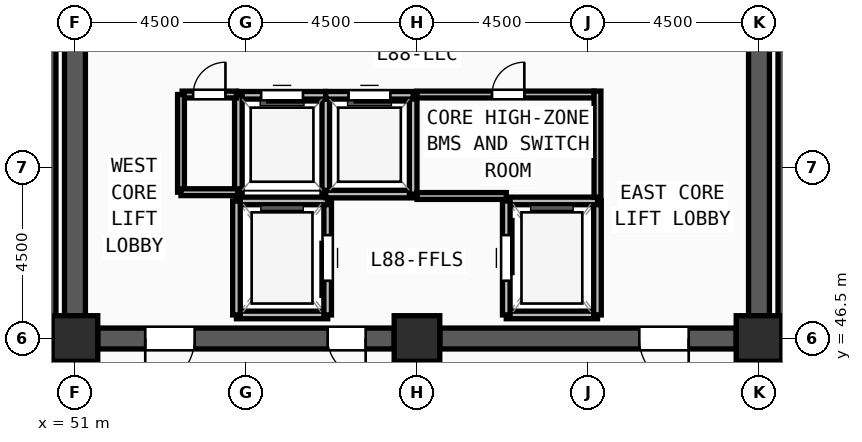
"""IFC4 building model, lengths in metres.
Left out: names, types, materials, properties, quantities, classifications, styles, units other than length and angle.
Written with IfcOpenShell. Run it as: python <this file> out.ifc"""

import sys

from ifc_helpers import new_model, si_unit, direction, frame, frame_2d, origin, origin_2d, place, context, subcontext, project, spatial, rectangle, extrude, source, transform, mapped, element, fill, save


model = new_model("IFC4")
c1 = context("Model", 3, precision=1e-05, world=origin(), true_north=direction((0.0, 1.0)))
c2 = subcontext(c1, "Body", "Model", "MODEL_VIEW")
j1 = project(units=[si_unit("LENGTHUNIT", "METRE"), si_unit("PLANEANGLEUNIT", "RADIAN")], contexts=[c1])
p1 = place(None, origin())
s1 = spatial("IfcSite", under=j1, at=p1, CompositionType="ELEMENT")
p2 = place(p1, origin())
s2 = spatial("IfcBuilding", under=s1, at=p2, CompositionType="ELEMENT")
p3 = place(p2, frame((0.0, 0.0, 339.75)))
s3 = spatial("IfcBuildingStorey", under=s2, at=p3, CompositionType="ELEMENT", Elevation=339.75)
m1 = source(origin(), c2, "Body", "SweptSolid", [
    extrude(rectangle(XDim=1.2, YDim=1.2, at=origin_2d()), origin(), (0.0, 0.0, 1.0), 3.75),
])
for number, where, z_axis, x_axis in (
    (1, (51.0, 46.5, 0.0), (0.0, 0.0, 1.0), (1.0, 0.0, 0.0)),
    (2, (60.0, 46.5, 0.0), (0.0, 0.0, 1.0), (1.0, 0.0, 0.0)),
    (3, (69.0, 46.5, 0.0), (0.0, 0.0, 1.0), (1.0, 0.0, 0.0)),
):
    element("IfcColumn", number, at=place(p3, frame(where, z_axis=z_axis, x_axis=x_axis)), inside=s3, PredefinedType="COLUMN", context=c2, shape_type="MappedRepresentation", body=[
        mapped(m1, transform((0.0, 0.0, 0.0), x_axis=(1.0, 0.0, 0.0), y_axis=(0.0, 1.0, 0.0), z_axis=(0.0, 0.0, 1.0), scale=1.0)),
    ])
p4 = place(p3, frame((69.0, 60.9, 0.0), z_axis=(0.0, 0.0, 1.0), x_axis=(0.0, -1.0, 0.0)))
e4 = element("IfcWall", 4, at=p4, inside=s3, PredefinedType="SHEAR", context=c2, shape_type="SweptSolid", body=[
    extrude(rectangle(XDim=13.8, YDim=0.55, at=frame_2d((6.9, 0.0))), origin(), (0.0, 0.0, 1.0), 3.57),
])
m2 = source(origin(), c2, "Body", "SweptSolid", [
    extrude(rectangle(XDim=1.2, YDim=2.2, at=frame_2d((0.6, 1.1))), frame((0.0, 0.285, 0.0), z_axis=(0.0, -1.0, 0.0), x_axis=(1.0, 0.0, 0.0)), (0.0, 0.0, 1.0), 0.57),
])
p5 = place(p4, frame((1.35, 0.0, 0.0)))
e5 = element("IfcOpeningElement", 5, at=p5, cuts=e4, PredefinedType="OPENING", context=c2, shape_type="MappedRepresentation", body=[
    mapped(m2, transform((0.0, 0.0, 0.0), x_axis=(1.0, 0.0, 0.0), y_axis=(0.0, 1.0, 0.0), z_axis=(0.0, 0.0, 1.0), scale=1.0)),
])
p6 = place(p3, frame((68.4, 46.5, 0.0), z_axis=(0.0, 0.0, 1.0), x_axis=(-1.0, 0.0, 0.0)))
e6 = element("IfcWall", 6, at=p6, inside=s3, PredefinedType="SHEAR", context=c2, shape_type="SweptSolid", body=[
    extrude(rectangle(XDim=7.8, YDim=0.55, at=frame_2d((3.9, 0.0))), origin(), (0.0, 0.0, 1.0), 3.57),
])
m3 = source(origin(), c2, "Body", "SweptSolid", [
    extrude(rectangle(XDim=1.3, YDim=2.2, at=frame_2d((0.65, 1.1))), frame((0.0, 0.285, 0.0), z_axis=(0.0, -1.0, 0.0), x_axis=(1.0, 0.0, 0.0)), (0.0, 0.0, 1.0), 0.57),
])
p7 = place(p6, frame((1.25, 0.0, 0.0)))
e7 = element("IfcOpeningElement", 7, at=p7, cuts=e6, PredefinedType="OPENING", context=c2, shape_type="MappedRepresentation", body=[
    mapped(m3, transform((0.0, 0.0, 0.0), x_axis=(1.0, 0.0, 0.0), y_axis=(0.0, 1.0, 0.0), z_axis=(0.0, 0.0, 1.0), scale=1.0)),
])
p8 = place(p3, frame((59.4, 46.5, 0.0), z_axis=(0.0, 0.0, 1.0), x_axis=(-1.0, 0.0, 0.0)))
e8 = element("IfcWall", 8, at=p8, inside=s3, PredefinedType="SHEAR", context=c2, shape_type="SweptSolid", body=[
    extrude(rectangle(XDim=7.8, YDim=0.55, at=frame_2d((3.9, 0.0))), origin(), (0.0, 0.0, 1.0), 3.57),
])
p9 = place(p8, frame((5.25, 0.0, 0.0)))
e9 = element("IfcOpeningElement", 9, at=p9, cuts=e8, PredefinedType="OPENING", context=c2, shape_type="MappedRepresentation", body=[
    mapped(m3, transform((0.0, 0.0, 0.0), x_axis=(1.0, 0.0, 0.0), y_axis=(0.0, 1.0, 0.0), z_axis=(0.0, 0.0, 1.0), scale=1.0)),
])
m4 = source(origin(), c2, "Body", "SweptSolid", [
    extrude(rectangle(XDim=1.0, YDim=2.2, at=frame_2d((0.5, 1.1))), frame((0.0, 0.285, 0.0), z_axis=(0.0, -1.0, 0.0), x_axis=(1.0, 0.0, 0.0)), (0.0, 0.0, 1.0), 0.57),
])
p10 = place(p8, frame((0.75, 0.0, 0.0)))
e10 = element("IfcOpeningElement", 10, at=p10, cuts=e8, PredefinedType="OPENING", context=c2, shape_type="MappedRepresentation", body=[
    mapped(m4, transform((0.0, 0.0, 0.0), x_axis=(1.0, 0.0, 0.0), y_axis=(0.0, 1.0, 0.0), z_axis=(0.0, 0.0, 1.0), scale=1.0)),
])
p11 = place(p3, frame((51.0, 47.1, 0.0), z_axis=(0.0, 0.0, 1.0), x_axis=(0.0, 1.0, 0.0)))
e11 = element("IfcWall", 11, at=p11, inside=s3, PredefinedType="SHEAR", context=c2, shape_type="SweptSolid", body=[
    extrude(rectangle(XDim=13.8, YDim=0.55, at=frame_2d((6.9, 0.0))), origin(), (0.0, 0.0, 1.0), 3.57),
])
for number, where, z_axis, x_axis in (
    (12, (50.38, 46.7, 0.0), (0.0, 0.0, 1.0), (0.0, 1.0, 0.0)),
    (13, (69.62, 54.52, 0.0), (0.0, 0.0, 1.0), (0.0, -1.0, 0.0)),
):
    element("IfcWall", number, at=place(p3, frame(where, z_axis=z_axis, x_axis=x_axis)), inside=s3, PredefinedType="SOLIDWALL", context=c2, shape_type="SweptSolid", body=[
        extrude(rectangle(XDim=7.82, YDim=0.24, at=frame_2d((3.91, 0.0))), origin(), (0.0, 0.0, 1.0), 3.57),
    ])
p12 = place(p3, frame((55.25, 47.12, 0.0), z_axis=(0.0, 0.0, 1.0), x_axis=(1.0, 0.0, 0.0)))
e14 = element("IfcWall", 14, at=p12, inside=s3, PredefinedType="SOLIDWALL", context=c2, shape_type="SweptSolid", body=[
    extrude(rectangle(XDim=2.4, YDim=0.2, at=frame_2d((1.2, 0.0))), origin(), (0.0, 0.0, 1.0), 3.57),
])
p13 = place(p3, frame((57.65, 47.12, 0.0), z_axis=(0.0, 0.0, 1.0), x_axis=(0.0, 1.0, 0.0)))
e15 = element("IfcWall", 15, at=p13, inside=s3, PredefinedType="SOLIDWALL", context=c2, shape_type="SweptSolid", body=[
    extrude(rectangle(XDim=3.0, YDim=0.2, at=frame_2d((1.5, 0.0))), origin(), (0.0, 0.0, 1.0), 3.57),
])
m5 = source(origin(), c2, "Body", "SweptSolid", [
    extrude(rectangle(XDim=1.2, YDim=2.3, at=frame_2d((0.6, 1.15))), frame((0.0, 0.11, 0.0), z_axis=(0.0, -1.0, 0.0), x_axis=(1.0, 0.0, 0.0)), (0.0, 0.0, 1.0), 0.22),
])
p14 = place(p13, frame((0.9, 0.0, 0.0)))
e16 = element("IfcOpeningElement", 16, at=p14, cuts=e15, PredefinedType="OPENING", context=c2, shape_type="MappedRepresentation", body=[
    mapped(m5, transform((0.0, 0.0, 0.0), x_axis=(1.0, 0.0, 0.0), y_axis=(0.0, 1.0, 0.0), z_axis=(0.0, 0.0, 1.0), scale=1.0)),
])
p15 = place(p3, frame((57.65, 50.12, 0.0), z_axis=(0.0, 0.0, 1.0), x_axis=(-1.0, 0.0, 0.0)))
e17 = element("IfcWall", 17, at=p15, inside=s3, PredefinedType="SOLIDWALL", context=c2, shape_type="SweptSolid", body=[
    extrude(rectangle(XDim=2.4, YDim=0.2, at=frame_2d((1.2, 0.0))), origin(), (0.0, 0.0, 1.0), 3.57),
])
p16 = place(p3, frame((55.25, 50.12, 0.0), z_axis=(0.0, 0.0, 1.0), x_axis=(0.0, -1.0, 0.0)))
e18 = element("IfcWall", 18, at=p16, inside=s3, PredefinedType="SOLIDWALL", context=c2, shape_type="SweptSolid", body=[
    extrude(rectangle(XDim=3.0, YDim=0.2, at=frame_2d((1.5, 0.0))), origin(), (0.0, 0.0, 1.0), 3.57),
])
p17 = place(p3, frame((62.35, 47.12, 0.0), z_axis=(0.0, 0.0, 1.0), x_axis=(1.0, 0.0, 0.0)))
e19 = element("IfcWall", 19, at=p17, inside=s3, PredefinedType="SOLIDWALL", context=c2, shape_type="SweptSolid", body=[
    extrude(rectangle(XDim=2.4, YDim=0.2, at=frame_2d((1.2, 0.0))), origin(), (0.0, 0.0, 1.0), 3.57),
])
p18 = place(p3, frame((64.75, 47.12, 0.0), z_axis=(0.0, 0.0, 1.0), x_axis=(0.0, 1.0, 0.0)))
e20 = element("IfcWall", 20, at=p18, inside=s3, PredefinedType="SOLIDWALL", context=c2, shape_type="SweptSolid", body=[
    extrude(rectangle(XDim=3.0, YDim=0.2, at=frame_2d((1.5, 0.0))), origin(), (0.0, 0.0, 1.0), 3.57),
])
p19 = place(p3, frame((64.75, 50.12, 0.0), z_axis=(0.0, 0.0, 1.0), x_axis=(-1.0, 0.0, 0.0)))
e21 = element("IfcWall", 21, at=p19, inside=s3, PredefinedType="SOLIDWALL", context=c2, shape_type="SweptSolid", body=[
    extrude(rectangle(XDim=2.4, YDim=0.2, at=frame_2d((1.2, 0.0))), origin(), (0.0, 0.0, 1.0), 3.57),
])
p20 = place(p3, frame((62.35, 50.12, 0.0), z_axis=(0.0, 0.0, 1.0), x_axis=(0.0, -1.0, 0.0)))
e22 = element("IfcWall", 22, at=p20, inside=s3, PredefinedType="SOLIDWALL", context=c2, shape_type="SweptSolid", body=[
    extrude(rectangle(XDim=3.0, YDim=0.2, at=frame_2d((1.5, 0.0))), origin(), (0.0, 0.0, 1.0), 3.57),
])
p21 = place(p20, frame((0.9, 0.0, 0.0)))
e23 = element("IfcOpeningElement", 23, at=p21, cuts=e22, PredefinedType="OPENING", context=c2, shape_type="MappedRepresentation", body=[
    mapped(m5, transform((0.0, 0.0, 0.0), x_axis=(1.0, 0.0, 0.0), y_axis=(0.0, 1.0, 0.0), z_axis=(0.0, 0.0, 1.0), scale=1.0)),
])
p22 = place(p3, frame((57.6, 50.3, 0.0), z_axis=(0.0, 0.0, 1.0), x_axis=(0.0, 1.0, 0.0)))
e24 = element("IfcWall", 24, at=p22, inside=s3, PredefinedType="SOLIDWALL", context=c2, shape_type="SweptSolid", body=[
    extrude(rectangle(XDim=2.6, YDim=0.2, at=frame_2d((1.3, 0.0))), origin(), (0.0, 0.0, 1.0), 3.57),
])
p23 = place(p3, frame((57.6, 52.9, 0.0), z_axis=(0.0, 0.0, 1.0), x_axis=(-1.0, 0.0, 0.0)))
e25 = element("IfcWall", 25, at=p23, inside=s3, PredefinedType="SOLIDWALL", context=c2, shape_type="SweptSolid", body=[
    extrude(rectangle(XDim=2.3, YDim=0.2, at=frame_2d((1.15, 0.0))), origin(), (0.0, 0.0, 1.0), 3.57),
])
m6 = source(origin(), c2, "Body", "SweptSolid", [
    extrude(rectangle(XDim=1.1, YDim=2.2, at=frame_2d((0.55, 1.1))), frame((0.0, 0.11, 0.0), z_axis=(0.0, -1.0, 0.0), x_axis=(1.0, 0.0, 0.0)), (0.0, 0.0, 1.0), 0.22),
])
p24 = place(p23, frame((0.6, 0.0, 0.0)))
e26 = element("IfcOpeningElement", 26, at=p24, cuts=e25, PredefinedType="OPENING", context=c2, shape_type="MappedRepresentation", body=[
    mapped(m6, transform((0.0, 0.0, 0.0), x_axis=(1.0, 0.0, 0.0), y_axis=(0.0, 1.0, 0.0), z_axis=(0.0, 0.0, 1.0), scale=1.0)),
])
p25 = place(p3, frame((55.3, 52.9, 0.0), z_axis=(0.0, 0.0, 1.0), x_axis=(0.0, -1.0, 0.0)))
e27 = element("IfcWall", 27, at=p25, inside=s3, PredefinedType="SOLIDWALL", context=c2, shape_type="SweptSolid", body=[
    extrude(rectangle(XDim=2.6, YDim=0.2, at=frame_2d((1.3, 0.0))), origin(), (0.0, 0.0, 1.0), 3.57),
])
p26 = place(p3, frame((57.6, 50.3, 0.0), z_axis=(0.0, 0.0, 1.0), x_axis=(1.0, 0.0, 0.0)))
e28 = element("IfcWall", 28, at=p26, inside=s3, PredefinedType="SOLIDWALL", context=c2, shape_type="SweptSolid", body=[
    extrude(rectangle(XDim=2.3, YDim=0.2, at=frame_2d((1.15, 0.0))), origin(), (0.0, 0.0, 1.0), 3.57),
])
p27 = place(p3, frame((59.9, 50.3, 0.0), z_axis=(0.0, 0.0, 1.0), x_axis=(0.0, 1.0, 0.0)))
e29 = element("IfcWall", 29, at=p27, inside=s3, PredefinedType="SOLIDWALL", context=c2, shape_type="SweptSolid", body=[
    extrude(rectangle(XDim=2.6, YDim=0.2, at=frame_2d((1.3, 0.0))), origin(), (0.0, 0.0, 1.0), 3.57),
])
p28 = place(p3, frame((59.9, 52.9, 0.0), z_axis=(0.0, 0.0, 1.0), x_axis=(-1.0, 0.0, 0.0)))
e30 = element("IfcWall", 30, at=p28, inside=s3, PredefinedType="SOLIDWALL", context=c2, shape_type="SweptSolid", body=[
    extrude(rectangle(XDim=2.3, YDim=0.2, at=frame_2d((1.15, 0.0))), origin(), (0.0, 0.0, 1.0), 3.57),
])
p29 = place(p28, frame((0.6, 0.0, 0.0)))
e31 = element("IfcOpeningElement", 31, at=p29, cuts=e30, PredefinedType="OPENING", context=c2, shape_type="MappedRepresentation", body=[
    mapped(m6, transform((0.0, 0.0, 0.0), x_axis=(1.0, 0.0, 0.0), y_axis=(0.0, 1.0, 0.0), z_axis=(0.0, 0.0, 1.0), scale=1.0)),
])
p30 = place(p3, frame((60.0, 52.92, 0.0), z_axis=(0.0, 0.0, 1.0), x_axis=(1.0, 0.0, 0.0)))
e32 = element("IfcWall", 32, at=p30, inside=s3, PredefinedType="PARTITIONING", context=c2, shape_type="SweptSolid", body=[
    extrude(rectangle(XDim=4.66, YDim=0.18, at=frame_2d((2.33, 0.0))), origin(), (0.0, 0.0, 1.0), 3.57),
])
m7 = source(origin(), c2, "Body", "SweptSolid", [
    extrude(rectangle(XDim=0.85, YDim=2.1, at=frame_2d((0.425, 1.05))), frame((0.0, 0.1, 0.0), z_axis=(0.0, -1.0, 0.0), x_axis=(1.0, 0.0, 0.0)), (0.0, 0.0, 1.0), 0.2),
])
p31 = place(p30, frame((1.975, 0.0, 0.0)))
e33 = element("IfcOpeningElement", 33, at=p31, cuts=e32, PredefinedType="OPENING", context=c2, shape_type="MappedRepresentation", body=[
    mapped(m7, transform((0.0, 0.0, 0.0), x_axis=(1.0, 0.0, 0.0), y_axis=(0.0, 1.0, 0.0), z_axis=(0.0, 0.0, 1.0), scale=1.0)),
])
p32 = place(p3, frame((53.82, 52.92, 0.0), z_axis=(0.0, 0.0, 1.0), x_axis=(1.0, 0.0, 0.0)))
e34 = element("IfcWall", 34, at=p32, inside=s3, PredefinedType="PARTITIONING", context=c2, shape_type="SweptSolid", body=[
    extrude(rectangle(XDim=1.43, YDim=0.18, at=frame_2d((0.715, 0.0))), origin(), (0.0, 0.0, 1.0), 3.57),
])
p33 = place(p32, frame((0.29, 0.0, 0.0)))
e35 = element("IfcOpeningElement", 35, at=p33, cuts=e34, PredefinedType="OPENING", context=c2, shape_type="MappedRepresentation", body=[
    mapped(m7, transform((0.0, 0.0, 0.0), x_axis=(1.0, 0.0, 0.0), y_axis=(0.0, 1.0, 0.0), z_axis=(0.0, 0.0, 1.0), scale=1.0)),
])
p34 = place(p3, frame((53.79, 50.35, 0.0), z_axis=(0.0, 0.0, 1.0), x_axis=(0.0, 1.0, 0.0)))
e36 = element("IfcWall", 36, at=p34, inside=s3, PredefinedType="PARTITIONING", context=c2, shape_type="SweptSolid", body=[
    extrude(rectangle(XDim=2.57, YDim=0.18, at=frame_2d((1.285, 0.0))), origin(), (0.0, 0.0, 1.0), 3.57),
])
p35 = place(p3, frame((53.79, 50.35, 0.0), z_axis=(0.0, 0.0, 1.0), x_axis=(1.0, 0.0, 0.0)))
e37 = element("IfcWall", 37, at=p35, inside=s3, PredefinedType="PARTITIONING", context=c2, shape_type="SweptSolid", body=[
    extrude(rectangle(XDim=1.49, YDim=0.18, at=frame_2d((0.745, 0.0))), origin(), (0.0, 0.0, 1.0), 3.57),
])
p36 = place(p3, frame((64.75, 50.22, 0.0), z_axis=(0.0, 0.0, 1.0), x_axis=(0.0, 1.0, 0.0)))
e38 = element("IfcWall", 38, at=p36, inside=s3, PredefinedType="PARTITIONING", context=c2, shape_type="SweptSolid", body=[
    extrude(rectangle(XDim=2.79, YDim=0.18, at=frame_2d((1.395, 0.0))), origin(), (0.0, 0.0, 1.0), 3.57),
])
p37 = place(p3, frame((60.0, 50.25, 0.0), z_axis=(0.0, 0.0, 1.0), x_axis=(1.0, 0.0, 0.0)))
e39 = element("IfcWall", 39, at=p37, inside=s3, PredefinedType="PARTITIONING", context=c2, shape_type="SweptSolid", body=[
    extrude(rectangle(XDim=2.35, YDim=0.18, at=frame_2d((1.175, 0.0))), origin(), (0.0, 0.0, 1.0), 3.57),
])
m8 = source(origin(), c2, "Body", "SweptSolid", [
    extrude(rectangle(XDim=1.3, YDim=2.2, at=frame_2d((0.65, 1.1))), frame((0.0, 0.025, 0.0), z_axis=(0.0, -1.0, 0.0), x_axis=(1.0, 0.0, 0.0)), (0.0, 0.0, 1.0), 0.05),
])
p38 = place(p9, origin())
e40 = element("IfcDoor", 40, at=p38, inside=s3, OperationType="SINGLE_SWING_RIGHT", PredefinedType="DOOR", context=c2, shape_type="MappedRepresentation", body=[
    mapped(m8, transform((0.0, 0.0, 0.0), x_axis=(1.0, 0.0, 0.0), y_axis=(0.0, 1.0, 0.0), z_axis=(0.0, 0.0, 1.0), scale=1.0)),
])
fill(e9, e40)
m9 = source(origin(), c2, "Body", "SweptSolid", [
    extrude(rectangle(XDim=1.0, YDim=2.2, at=frame_2d((0.5, 1.1))), frame((0.0, 0.025, 0.0), z_axis=(0.0, -1.0, 0.0), x_axis=(1.0, 0.0, 0.0)), (0.0, 0.0, 1.0), 0.05),
])
p39 = place(p10, origin())
e41 = element("IfcDoor", 41, at=p39, inside=s3, OperationType="SINGLE_SWING_LEFT", PredefinedType="DOOR", context=c2, shape_type="MappedRepresentation", body=[
    mapped(m9, transform((0.0, 0.0, 0.0), x_axis=(1.0, 0.0, 0.0), y_axis=(0.0, 1.0, 0.0), z_axis=(0.0, 0.0, 1.0), scale=1.0)),
])
fill(e10, e41)
p40 = place(p7, origin())
e42 = element("IfcDoor", 42, at=p40, inside=s3, OperationType="SINGLE_SWING_LEFT", PredefinedType="DOOR", context=c2, shape_type="MappedRepresentation", body=[
    mapped(m8, transform((0.0, 0.0, 0.0), x_axis=(1.0, 0.0, 0.0), y_axis=(0.0, 1.0, 0.0), z_axis=(0.0, 0.0, 1.0), scale=1.0)),
])
fill(e7, e42)
m10 = source(origin(), c2, "Body", "SweptSolid", [
    extrude(rectangle(XDim=1.2, YDim=2.3, at=frame_2d((0.6, 1.15))), frame((0.0, 0.025, 0.0), z_axis=(0.0, -1.0, 0.0), x_axis=(1.0, 0.0, 0.0)), (0.0, 0.0, 1.0), 0.05),
])
p41 = place(p14, origin())
e43 = element("IfcDoor", 43, at=p41, inside=s3, OperationType="SLIDING_TO_LEFT", PredefinedType="DOOR", context=c2, shape_type="MappedRepresentation", body=[
    mapped(m10, transform((0.0, 0.0, 0.0), x_axis=(1.0, 0.0, 0.0), y_axis=(0.0, 1.0, 0.0), z_axis=(0.0, 0.0, 1.0), scale=1.0)),
])
fill(e16, e43)
p42 = place(p21, origin())
e44 = element("IfcDoor", 44, at=p42, inside=s3, OperationType="SLIDING_TO_LEFT", PredefinedType="DOOR", context=c2, shape_type="MappedRepresentation", body=[
    mapped(m10, transform((0.0, 0.0, 0.0), x_axis=(1.0, 0.0, 0.0), y_axis=(0.0, 1.0, 0.0), z_axis=(0.0, 0.0, 1.0), scale=1.0)),
])
fill(e23, e44)
m11 = source(origin(), c2, "Body", "SweptSolid", [
    extrude(rectangle(XDim=1.1, YDim=2.2, at=frame_2d((0.55, 1.1))), frame((0.0, 0.025, 0.0), z_axis=(0.0, -1.0, 0.0), x_axis=(1.0, 0.0, 0.0)), (0.0, 0.0, 1.0), 0.05),
])
p43 = place(p24, origin())
e45 = element("IfcDoor", 45, at=p43, inside=s3, OperationType="SLIDING_TO_LEFT", PredefinedType="DOOR", context=c2, shape_type="MappedRepresentation", body=[
    mapped(m11, transform((0.0, 0.0, 0.0), x_axis=(1.0, 0.0, 0.0), y_axis=(0.0, 1.0, 0.0), z_axis=(0.0, 0.0, 1.0), scale=1.0)),
])
fill(e26, e45)
p44 = place(p29, origin())
e46 = element("IfcDoor", 46, at=p44, inside=s3, OperationType="SLIDING_TO_LEFT", PredefinedType="DOOR", context=c2, shape_type="MappedRepresentation", body=[
    mapped(m11, transform((0.0, 0.0, 0.0), x_axis=(1.0, 0.0, 0.0), y_axis=(0.0, 1.0, 0.0), z_axis=(0.0, 0.0, 1.0), scale=1.0)),
])
fill(e31, e46)
m12 = source(origin(), c2, "Body", "SweptSolid", [
    extrude(rectangle(XDim=0.85, YDim=2.1, at=frame_2d((0.425, 1.05))), frame((0.0, 0.025, 0.0), z_axis=(0.0, -1.0, 0.0), x_axis=(1.0, 0.0, 0.0)), (0.0, 0.0, 1.0), 0.05),
])
p45 = place(p31, origin())
e47 = element("IfcDoor", 47, at=p45, inside=s3, OperationType="SINGLE_SWING_RIGHT", PredefinedType="DOOR", context=c2, shape_type="MappedRepresentation", body=[
    mapped(m12, transform((0.0, 0.0, 0.0), x_axis=(1.0, 0.0, 0.0), y_axis=(0.0, 1.0, 0.0), z_axis=(0.0, 0.0, 1.0), scale=1.0)),
])
fill(e33, e47)
p46 = place(p33, origin())
e48 = element("IfcDoor", 48, at=p46, inside=s3, OperationType="SINGLE_SWING_RIGHT", PredefinedType="DOOR", context=c2, shape_type="MappedRepresentation", body=[
    mapped(m12, transform((0.0, 0.0, 0.0), x_axis=(1.0, 0.0, 0.0), y_axis=(0.0, 1.0, 0.0), z_axis=(0.0, 0.0, 1.0), scale=1.0)),
])
fill(e35, e48)
save(model, sys.argv[1])
